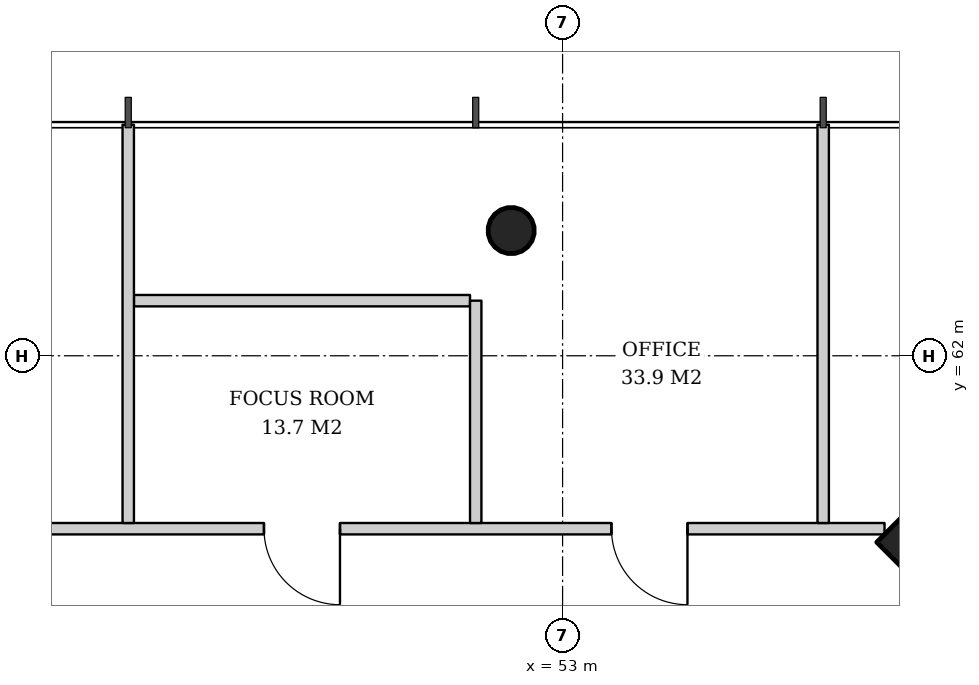
"""IFC4 building model, lengths in metres.
Left out: names, types, materials, properties, quantities, classifications, styles, units other than length and angle.
Written with IfcOpenShell. Run it as: python <this file> out.ifc"""

import sys

from ifc_helpers import new_model, si_unit, direction, frame, frame_2d, origin, origin_2d, place, context, subcontext, project, spatial, rectangle, hollow_circle, extrude, element, fill, save


model = new_model("IFC4")
c1 = context("Model", 3, precision=1e-05, world=origin(), true_north=direction((0.0, 1.0)))
c2 = subcontext(c1, "Body", "Model", "MODEL_VIEW")
j1 = project(units=[si_unit("LENGTHUNIT", "METRE"), si_unit("PLANEANGLEUNIT", "RADIAN")], contexts=[c1])
p1 = place(None, origin())
s1 = spatial("IfcSite", under=j1, at=p1, CompositionType="ELEMENT")
p2 = place(p1, origin())
s2 = spatial("IfcBuilding", under=s1, at=p2, CompositionType="ELEMENT")
p3 = place(p2, frame((0.0, 0.0, 218.6)))
s3 = spatial("IfcBuildingStorey", under=s2, at=p3, CompositionType="ELEMENT", Elevation=218.6)
p4 = place(p3, frame((58.586, 59.586, 0.0), z_axis=(-0.031900153262, -0.031900153262, 0.998981861919), x_axis=(0.707106781187, -0.707106781187, 0.0)))
e1 = element("IfcColumn", 1, at=p4, inside=s3, PredefinedType="COLUMN", context=c2, shape_type="SweptSolid", body=[
    extrude(rectangle(XDim=2.0, YDim=2.0, at=origin_2d()), origin(), (0.0, 0.0, 1.0), 3.804),
])
p5 = place(p3, frame((52.343, 63.686, 0.0), z_axis=(-0.015924037308, -0.031976494272, 0.99936176075), x_axis=(0.895145027055, -0.445775033553, 0.0)))
e2 = element("IfcColumn", 2, at=p5, inside=s3, PredefinedType="COLUMN", context=c2, shape_type="SweptSolid", body=[
    extrude(hollow_circle(Radius=0.305, WallThickness=0.025, at=origin_2d()), origin(), (0.0, 0.0, 1.0), 3.802),
])
p6 = place(p3, frame((51.782, 62.725, 0.0), z_axis=(0.0, 0.0, 1.0), x_axis=(-1.0, 0.0, 0.0)))
e3 = element("IfcWall", 3, at=p6, inside=s3, PredefinedType="PARTITIONING", context=c2, shape_type="SweptSolid", body=[
    extrude(rectangle(XDim=4.422, YDim=0.15, at=frame_2d((2.211, 0.0))), origin(), (0.0, 0.0, 1.0), 2.867),
])
p7 = place(p3, frame((57.236, 59.725, 0.0), z_axis=(0.0, 0.0, 1.0), x_axis=(-1.0, 0.0, 0.0)))
e4 = element("IfcWall", 4, at=p7, inside=s3, PredefinedType="PARTITIONING", context=c2, shape_type="SweptSolid", body=[
    extrude(rectangle(XDim=24.472, YDim=0.15, at=frame_2d((12.236, 0.0))), origin(), (0.0, 0.0, 1.0), 2.867),
])
p8 = place(p7, frame((2.593, 0.0, 0.0)))
e5 = element("IfcOpeningElement", 5, at=p8, cuts=e4, PredefinedType="OPENING", context=c2, shape_type="SweptSolid", body=[
    extrude(rectangle(XDim=1.0, YDim=2.1, at=frame_2d((0.5, 1.05))), frame((0.0, 0.085, 0.0), z_axis=(0.0, -1.0, 0.0), x_axis=(1.0, 0.0, 0.0)), (0.0, 0.0, 1.0), 0.17),
])
p9 = place(p7, frame((7.164, 0.0, 0.0)))
e6 = element("IfcOpeningElement", 6, at=p9, cuts=e4, PredefinedType="OPENING", context=c2, shape_type="SweptSolid", body=[
    extrude(rectangle(XDim=1.0, YDim=2.1, at=frame_2d((0.5, 1.05))), frame((0.0, 0.085, 0.0), z_axis=(0.0, -1.0, 0.0), x_axis=(1.0, 0.0, 0.0)), (0.0, 0.0, 1.0), 0.17),
])
p10 = place(p7, frame((11.736, 0.0, 0.0)))
e7 = element("IfcOpeningElement", 7, at=p10, cuts=e4, PredefinedType="OPENING", context=c2, shape_type="SweptSolid", body=[
    extrude(rectangle(XDim=1.0, YDim=2.1, at=frame_2d((0.5, 1.05))), frame((0.0, 0.085, 0.0), z_axis=(0.0, -1.0, 0.0), x_axis=(1.0, 0.0, 0.0)), (0.0, 0.0, 1.0), 0.17),
])
p11 = place(p7, frame((16.307, 0.0, 0.0)))
e8 = element("IfcOpeningElement", 8, at=p11, cuts=e4, PredefinedType="OPENING", context=c2, shape_type="SweptSolid", body=[
    extrude(rectangle(XDim=1.0, YDim=2.1, at=frame_2d((0.5, 1.05))), frame((0.0, 0.085, 0.0), z_axis=(0.0, -1.0, 0.0), x_axis=(1.0, 0.0, 0.0)), (0.0, 0.0, 1.0), 0.17),
])
p12 = place(p7, frame((20.879, 0.0, 0.0)))
e9 = element("IfcOpeningElement", 9, at=p12, cuts=e4, PredefinedType="OPENING", context=c2, shape_type="SweptSolid", body=[
    extrude(rectangle(XDim=1.0, YDim=2.1, at=frame_2d((0.5, 1.05))), frame((0.0, 0.085, 0.0), z_axis=(0.0, -1.0, 0.0), x_axis=(1.0, 0.0, 0.0)), (0.0, 0.0, 1.0), 0.17),
])
p13 = place(p3, frame((56.428, 59.8, 0.0), z_axis=(0.0, 0.0, 1.0), x_axis=(0.0, 1.0, 0.0)))
e10 = element("IfcWall", 10, at=p13, inside=s3, PredefinedType="PARTITIONING", context=c2, shape_type="SweptSolid", body=[
    extrude(rectangle(XDim=5.24, YDim=0.15, at=frame_2d((2.62, 0.0))), origin(), (0.0, 0.0, 1.0), 3.12),
])
p14 = place(p3, frame((51.857, 59.8, 0.0), z_axis=(0.0, 0.0, 1.0), x_axis=(0.0, 1.0, 0.0)))
e11 = element("IfcWall", 11, at=p14, inside=s3, PredefinedType="PARTITIONING", context=c2, shape_type="SweptSolid", body=[
    extrude(rectangle(XDim=2.925, YDim=0.15, at=frame_2d((1.462, 0.0))), origin(), (0.0, 0.0, 1.0), 3.62),
])
p15 = place(p3, frame((47.286, 59.8, 0.0), z_axis=(0.0, 0.0, 1.0), x_axis=(0.0, 1.0, 0.0)))
e12 = element("IfcWall", 12, at=p15, inside=s3, PredefinedType="PARTITIONING", context=c2, shape_type="SweptSolid", body=[
    extrude(rectangle(XDim=5.24, YDim=0.15, at=frame_2d((2.62, 0.0))), origin(), (0.0, 0.0, 1.0), 3.12),
])
p16 = place(p8, origin())
e13 = element("IfcDoor", 13, at=p16, inside=s3, OperationType="SINGLE_SWING_LEFT", PredefinedType="DOOR", context=c2, shape_type="SweptSolid", body=[
    extrude(rectangle(XDim=1.0, YDim=2.1, at=frame_2d((0.5, 1.05))), frame((0.0, 0.025, 0.0), z_axis=(0.0, -1.0, 0.0), x_axis=(1.0, 0.0, 0.0)), (0.0, 0.0, 1.0), 0.05),
])
fill(e5, e13)
p17 = place(p9, origin())
e14 = element("IfcDoor", 14, at=p17, inside=s3, OperationType="SINGLE_SWING_LEFT", PredefinedType="DOOR", context=c2, shape_type="SweptSolid", body=[
    extrude(rectangle(XDim=1.0, YDim=2.1, at=frame_2d((0.5, 1.05))), frame((0.0, 0.025, 0.0), z_axis=(0.0, -1.0, 0.0), x_axis=(1.0, 0.0, 0.0)), (0.0, 0.0, 1.0), 0.05),
])
fill(e6, e14)
save(model, sys.argv[1])
